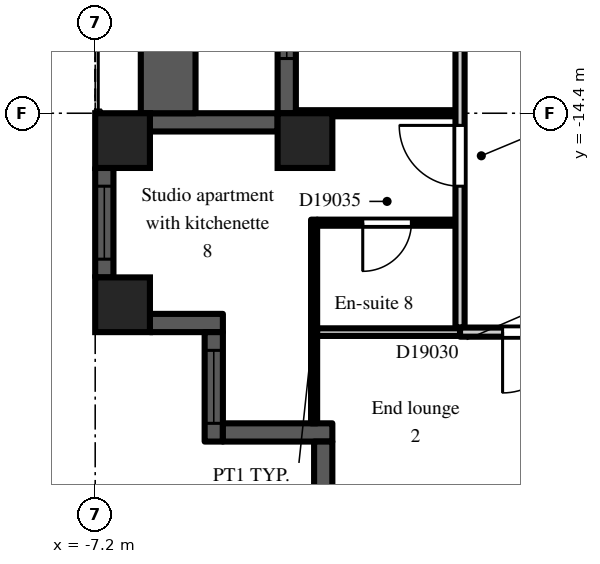
"""IFC4 building model, lengths in metres.
Left out: names, types, materials, properties, quantities, classifications, styles, units other than length and angle.
Written with IfcOpenShell. Run it as: python <this file> out.ifc"""

import sys

from ifc_helpers import new_model, si_unit, direction, frame, frame_2d, origin, origin_2d, place, context, subcontext, project, spatial, rectangle, extrude, element, fill, save


model = new_model("IFC4")
c1 = context("Model", 3, precision=1e-05, world=origin(), true_north=direction((0.0, 1.0)))
c2 = subcontext(c1, "Body", "Model", "MODEL_VIEW")
j1 = project(units=[si_unit("LENGTHUNIT", "METRE"), si_unit("PLANEANGLEUNIT", "RADIAN")], contexts=[c1])
p1 = place(None, origin())
s1 = spatial("IfcSite", under=j1, at=p1, CompositionType="ELEMENT")
p2 = place(p1, origin())
s2 = spatial("IfcBuilding", under=s1, at=p2, CompositionType="ELEMENT")
p3 = place(p2, frame((0.0, 0.0, 129.3)))
s3 = spatial("IfcBuildingStorey", under=s2, at=p3, CompositionType="ELEMENT", Elevation=129.3)
for number, where, z_axis, x_axis in (
    (1, (-6.75, -17.55, 0.0), (0.0, 0.0, 1.0), (1.0, 0.0, 0.0)),
    (2, (-6.75, -14.85, 0.0), (0.0, 0.0, 1.0), (1.0, 0.0, 0.0)),
    (3, (-3.75, -14.85, 0.0), (0.0, 0.0, 1.0), (1.0, 0.0, 0.0)),
):
    element("IfcColumn", number, at=place(p3, frame(where, z_axis=z_axis, x_axis=x_axis)), inside=s3, PredefinedType="COLUMN", context=c2, shape_type="SweptSolid", body=[
        extrude(rectangle(XDim=0.9, YDim=0.9, at=origin_2d()), origin(), (0.0, 0.0, 1.0), 3.0),
    ])
p4 = place(p3, frame((-4.05, -7.2, 0.0), z_axis=(0.0, 0.0, 1.0), x_axis=(0.0, -1.0, 0.0)))
e4 = element("IfcWall", 4, at=p4, inside=s3, PredefinedType="SOLIDWALL", context=c2, shape_type="SweptSolid", body=[
    extrude(rectangle(XDim=7.2, YDim=0.3, at=frame_2d((3.6, 0.0))), origin(), (0.0, 0.0, 1.0), 2.2),
])
p5 = place(p4, frame((3.0, 0.0, 0.0)))
e5 = element("IfcOpeningElement", 5, at=p5, cuts=e4, PredefinedType="OPENING", context=c2, shape_type="SweptSolid", body=[
    extrude(rectangle(XDim=1.2, YDim=2.05, at=frame_2d((0.6, 1.025))), frame((0.0, 0.16, 0.0), z_axis=(0.0, -1.0, 0.0), x_axis=(1.0, 0.0, 0.0)), (0.0, 0.0, 1.0), 0.32),
])
p6 = place(p4, frame((0.9, 0.0, 0.2)))
e6 = element("IfcOpeningElement", 6, at=p6, cuts=e4, PredefinedType="OPENING", context=c2, shape_type="SweptSolid", body=[
    extrude(rectangle(XDim=1.8, YDim=1.85, at=frame_2d((0.9, 0.925))), frame((0.0, 0.16, 0.0), z_axis=(0.0, -1.0, 0.0), x_axis=(1.0, 0.0, 0.0)), (0.0, 0.0, 1.0), 0.32),
])
p7 = place(p4, frame((4.5, 0.0, 0.2)))
e7 = element("IfcOpeningElement", 7, at=p7, cuts=e4, PredefinedType="OPENING", context=c2, shape_type="SweptSolid", body=[
    extrude(rectangle(XDim=1.8, YDim=1.85, at=frame_2d((0.9, 0.925))), frame((0.0, 0.16, 0.0), z_axis=(0.0, -1.0, 0.0), x_axis=(1.0, 0.0, 0.0)), (0.0, 0.0, 1.0), 0.32),
])
p8 = place(p3, frame((-4.2, -14.55, 0.0), z_axis=(0.0, 0.0, 1.0), x_axis=(-1.0, 0.0, 0.0)))
e8 = element("IfcWall", 8, at=p8, inside=s3, PredefinedType="SOLIDWALL", context=c2, shape_type="SweptSolid", body=[
    extrude(rectangle(XDim=2.1, YDim=0.3, at=frame_2d((1.05, 0.0))), origin(), (0.0, 0.0, 1.0), 2.2),
])
p9 = place(p3, frame((-7.05, -15.3, 0.0), z_axis=(0.0, 0.0, 1.0), x_axis=(0.0, -1.0, 0.0)))
e9 = element("IfcWall", 9, at=p9, inside=s3, PredefinedType="SOLIDWALL", context=c2, shape_type="SweptSolid", body=[
    extrude(rectangle(XDim=1.8, YDim=0.3, at=frame_2d((0.9, 0.0))), origin(), (0.0, 0.0, 1.0), 2.2),
])
p10 = place(p9, frame((0.3, 0.0, 0.2)))
e10 = element("IfcOpeningElement", 10, at=p10, cuts=e9, PredefinedType="OPENING", context=c2, shape_type="SweptSolid", body=[
    extrude(rectangle(XDim=1.2, YDim=1.85, at=frame_2d((0.6, 0.925))), frame((0.0, 0.16, 0.0), z_axis=(0.0, -1.0, 0.0), x_axis=(1.0, 0.0, 0.0)), (0.0, 0.0, 1.0), 0.32),
])
p11 = place(p3, frame((-6.3, -17.85, 0.0), z_axis=(0.0, 0.0, 1.0), x_axis=(1.0, 0.0, 0.0)))
e11 = element("IfcWall", 11, at=p11, inside=s3, PredefinedType="SOLIDWALL", context=c2, shape_type="SweptSolid", body=[
    extrude(rectangle(XDim=1.2, YDim=0.3, at=frame_2d((0.6, 0.0))), origin(), (0.0, 0.0, 1.0), 2.6),
])
p12 = place(p3, frame((-5.25, -18.0, 0.0), z_axis=(0.0, 0.0, 1.0), x_axis=(0.0, -1.0, 0.0)))
e12 = element("IfcWall", 12, at=p12, inside=s3, PredefinedType="SOLIDWALL", context=c2, shape_type="SweptSolid", body=[
    extrude(rectangle(XDim=1.8, YDim=0.3, at=frame_2d((0.9, 0.0))), origin(), (0.0, 0.0, 1.0), 2.6),
])
p13 = place(p12, frame((0.3, 0.0, 0.2)))
e13 = element("IfcOpeningElement", 13, at=p13, cuts=e12, PredefinedType="OPENING", context=c2, shape_type="SweptSolid", body=[
    extrude(rectangle(XDim=1.2, YDim=1.85, at=frame_2d((0.6, 0.925))), frame((0.0, 0.16, 0.0), z_axis=(0.0, -1.0, 0.0), x_axis=(1.0, 0.0, 0.0)), (0.0, 0.0, 1.0), 0.32),
])
p14 = place(p3, frame((-5.1, -19.65, 0.0), z_axis=(0.0, 0.0, 1.0), x_axis=(1.0, 0.0, 0.0)))
e14 = element("IfcWall", 14, at=p14, inside=s3, PredefinedType="SOLIDWALL", context=c2, shape_type="SweptSolid", body=[
    extrude(rectangle(XDim=1.8, YDim=0.3, at=frame_2d((0.9, 0.0))), origin(), (0.0, 0.0, 1.0), 2.6),
])
p15 = place(p3, frame((-3.45, -19.8, 0.0), z_axis=(0.0, 0.0, 1.0), x_axis=(0.0, -1.0, 0.0)))
e15 = element("IfcWall", 15, at=p15, inside=s3, PredefinedType="SOLIDWALL", context=c2, shape_type="SweptSolid", body=[
    extrude(rectangle(XDim=0.9, YDim=0.3, at=frame_2d((0.45, 0.0))), origin(), (0.0, 0.0, 1.0), 2.6),
])
p16 = place(p3, frame((-6.0, -14.4, 0.0), z_axis=(0.0, 0.0, 1.0), x_axis=(0.0, 1.0, 0.0)))
e16 = element("IfcWall", 16, at=p16, inside=s3, PredefinedType="PARAPET", context=c2, shape_type="SweptSolid", body=[
    extrude(rectangle(XDim=7.2, YDim=0.9, at=frame_2d((3.6, 0.0))), origin(), (0.0, 0.0, 1.0), 0.8),
])
p17 = place(p3, frame((-3.9, -14.4, 0.0), z_axis=(0.0, 0.0, 1.0), x_axis=(1.0, 0.0, 0.0)))
e17 = element("IfcWall", 17, at=p17, inside=s3, PredefinedType="PARTITIONING", context=c2, shape_type="SweptSolid", body=[
    extrude(rectangle(XDim=2.625, YDim=0.1, at=frame_2d((1.312, 0.0))), origin(), (0.0, 0.0, 1.0), 2.6),
])
p18 = place(p3, frame((-3.6, -19.5, 0.0), z_axis=(0.0, 0.0, 1.0), x_axis=(0.0, 1.0, 0.0)))
e18 = element("IfcWall", 18, at=p18, inside=s3, PredefinedType="PARTITIONING", context=c2, shape_type="SweptSolid", body=[
    extrude(rectangle(XDim=3.35, YDim=0.1, at=frame_2d((1.675, 0.0))), origin(), (0.0, 0.0, 1.0), 2.6),
])
p19 = place(p3, frame((-3.55, -18.0, 0.0), z_axis=(0.0, 0.0, 1.0), x_axis=(1.0, 0.0, 0.0)))
e19 = element("IfcWall", 19, at=p19, inside=s3, PredefinedType="PARTITIONING", context=c2, shape_type="SweptSolid", body=[
    extrude(rectangle(XDim=2.35, YDim=0.125, at=frame_2d((1.175, 0.0))), origin(), (0.0, 0.0, 1.0), 2.6),
])
p20 = place(p3, frame((-3.55, -16.2, 0.0), z_axis=(0.0, 0.0, 1.0), x_axis=(1.0, 0.0, 0.0)))
e20 = element("IfcWall", 20, at=p20, inside=s3, PredefinedType="PARTITIONING", context=c2, shape_type="SweptSolid", body=[
    extrude(rectangle(XDim=2.275, YDim=0.1, at=frame_2d((1.138, 0.0))), origin(), (0.0, 0.0, 1.0), 2.6),
])
p21 = place(p20, frame((0.75, 0.0, 0.0)))
e21 = element("IfcOpeningElement", 21, at=p21, cuts=e20, PredefinedType="OPENING", context=c2, shape_type="SweptSolid", body=[
    extrude(rectangle(XDim=0.8, YDim=2.1, at=frame_2d((0.4, 1.05))), frame((0.0, 0.06, 0.0), z_axis=(0.0, -1.0, 0.0), x_axis=(1.0, 0.0, 0.0)), (0.0, 0.0, 1.0), 0.12),
])
p22 = place(p3, frame((-1.2, -17.925, 0.0), z_axis=(0.0, 0.0, 1.0), x_axis=(0.0, 1.0, 0.0)))
e22 = element("IfcWall", 22, at=p22, inside=s3, PredefinedType="PARTITIONING", context=c2, shape_type="SweptSolid", body=[
    extrude(rectangle(XDim=10.65, YDim=0.15, at=frame_2d((5.325, 0.0))), origin(), (0.0, 0.0, 1.0), 2.6),
])
p23 = place(p22, frame((8.475, 0.0, 0.0)))
e23 = element("IfcOpeningElement", 23, at=p23, cuts=e22, PredefinedType="OPENING", context=c2, shape_type="SweptSolid", body=[
    extrude(rectangle(XDim=0.9, YDim=2.1, at=frame_2d((0.45, 1.05))), frame((0.0, 0.085, 0.0), z_axis=(0.0, -1.0, 0.0), x_axis=(1.0, 0.0, 0.0)), (0.0, 0.0, 1.0), 0.17),
])
p24 = place(p22, frame((2.325, 0.0, 0.0)))
e24 = element("IfcOpeningElement", 24, at=p24, cuts=e22, PredefinedType="OPENING", context=c2, shape_type="SweptSolid", body=[
    extrude(rectangle(XDim=1.0, YDim=2.1, at=frame_2d((0.5, 1.05))), frame((0.0, 0.085, 0.0), z_axis=(0.0, -1.0, 0.0), x_axis=(1.0, 0.0, 0.0)), (0.0, 0.0, 1.0), 0.17),
])
p25 = place(p3, frame((-1.2, -18.0, 0.0), z_axis=(0.0, 0.0, 1.0), x_axis=(1.0, 0.0, 0.0)))
e25 = element("IfcWall", 25, at=p25, inside=s3, PredefinedType="PARTITIONING", context=c2, shape_type="SweptSolid", body=[
    extrude(rectangle(XDim=2.4, YDim=0.15, at=frame_2d((1.2, 0.0))), origin(), (0.0, 0.0, 1.0), 2.6),
])
p26 = place(p25, frame((0.7, 0.0, 0.0)))
e26 = element("IfcOpeningElement", 26, at=p26, cuts=e25, PredefinedType="OPENING", context=c2, shape_type="SweptSolid", body=[
    extrude(rectangle(XDim=1.0, YDim=2.1, at=frame_2d((0.5, 1.05))), frame((0.0, 0.085, 0.0), z_axis=(0.0, -1.0, 0.0), x_axis=(1.0, 0.0, 0.0)), (0.0, 0.0, 1.0), 0.17),
])
p27 = place(p7, origin())
e27 = element("IfcWindow", 27, at=p27, inside=s3, PartitioningType="SINGLE_PANEL", PredefinedType="WINDOW", context=c2, shape_type="SweptSolid", body=[
    extrude(rectangle(XDim=1.8, YDim=1.85, at=frame_2d((0.9, 0.925))), frame((0.0, 0.03, 0.0), z_axis=(0.0, -1.0, 0.0), x_axis=(1.0, 0.0, 0.0)), (0.0, 0.0, 1.0), 0.06),
])
fill(e7, e27)
p28 = place(p10, origin())
e28 = element("IfcWindow", 28, at=p28, inside=s3, PartitioningType="SINGLE_PANEL", PredefinedType="WINDOW", context=c2, shape_type="SweptSolid", body=[
    extrude(rectangle(XDim=1.2, YDim=1.85, at=frame_2d((0.6, 0.925))), frame((0.0, 0.03, 0.0), z_axis=(0.0, -1.0, 0.0), x_axis=(1.0, 0.0, 0.0)), (0.0, 0.0, 1.0), 0.06),
])
fill(e10, e28)
p29 = place(p13, origin())
e29 = element("IfcWindow", 29, at=p29, inside=s3, PartitioningType="SINGLE_PANEL", PredefinedType="WINDOW", context=c2, shape_type="SweptSolid", body=[
    extrude(rectangle(XDim=1.2, YDim=1.85, at=frame_2d((0.6, 0.925))), frame((0.0, 0.03, 0.0), z_axis=(0.0, -1.0, 0.0), x_axis=(1.0, 0.0, 0.0)), (0.0, 0.0, 1.0), 0.06),
])
fill(e13, e29)
p30 = place(p26, frame((1.0, 0.0, 0.0), z_axis=(0.0, 0.0, 1.0), x_axis=(-1.0, 0.0, 0.0)))
e30 = element("IfcDoor", 30, at=p30, inside=s3, OperationType="SINGLE_SWING_RIGHT", PredefinedType="DOOR", context=c2, shape_type="SweptSolid", body=[
    extrude(rectangle(XDim=1.0, YDim=2.1, at=frame_2d((0.5, 1.05))), frame((0.0, 0.025, 0.0), z_axis=(0.0, -1.0, 0.0), x_axis=(1.0, 0.0, 0.0)), (0.0, 0.0, 1.0), 0.05),
])
fill(e26, e30)
p31 = place(p21, frame((0.8, 0.0, 0.0), z_axis=(0.0, 0.0, 1.0), x_axis=(-1.0, 0.0, 0.0)))
e31 = element("IfcDoor", 31, at=p31, inside=s3, OperationType="SINGLE_SWING_RIGHT", PredefinedType="DOOR", context=c2, shape_type="SweptSolid", body=[
    extrude(rectangle(XDim=0.8, YDim=2.1, at=frame_2d((0.4, 1.05))), frame((0.0, 0.025, 0.0), z_axis=(0.0, -1.0, 0.0), x_axis=(1.0, 0.0, 0.0)), (0.0, 0.0, 1.0), 0.05),
])
fill(e21, e31)
p32 = place(p24, origin())
e32 = element("IfcDoor", 32, at=p32, inside=s3, OperationType="SINGLE_SWING_RIGHT", PredefinedType="DOOR", context=c2, shape_type="SweptSolid", body=[
    extrude(rectangle(XDim=1.0, YDim=2.1, at=frame_2d((0.5, 1.05))), frame((0.0, 0.025, 0.0), z_axis=(0.0, -1.0, 0.0), x_axis=(1.0, 0.0, 0.0)), (0.0, 0.0, 1.0), 0.05),
])
fill(e24, e32)
save(model, sys.argv[1])
